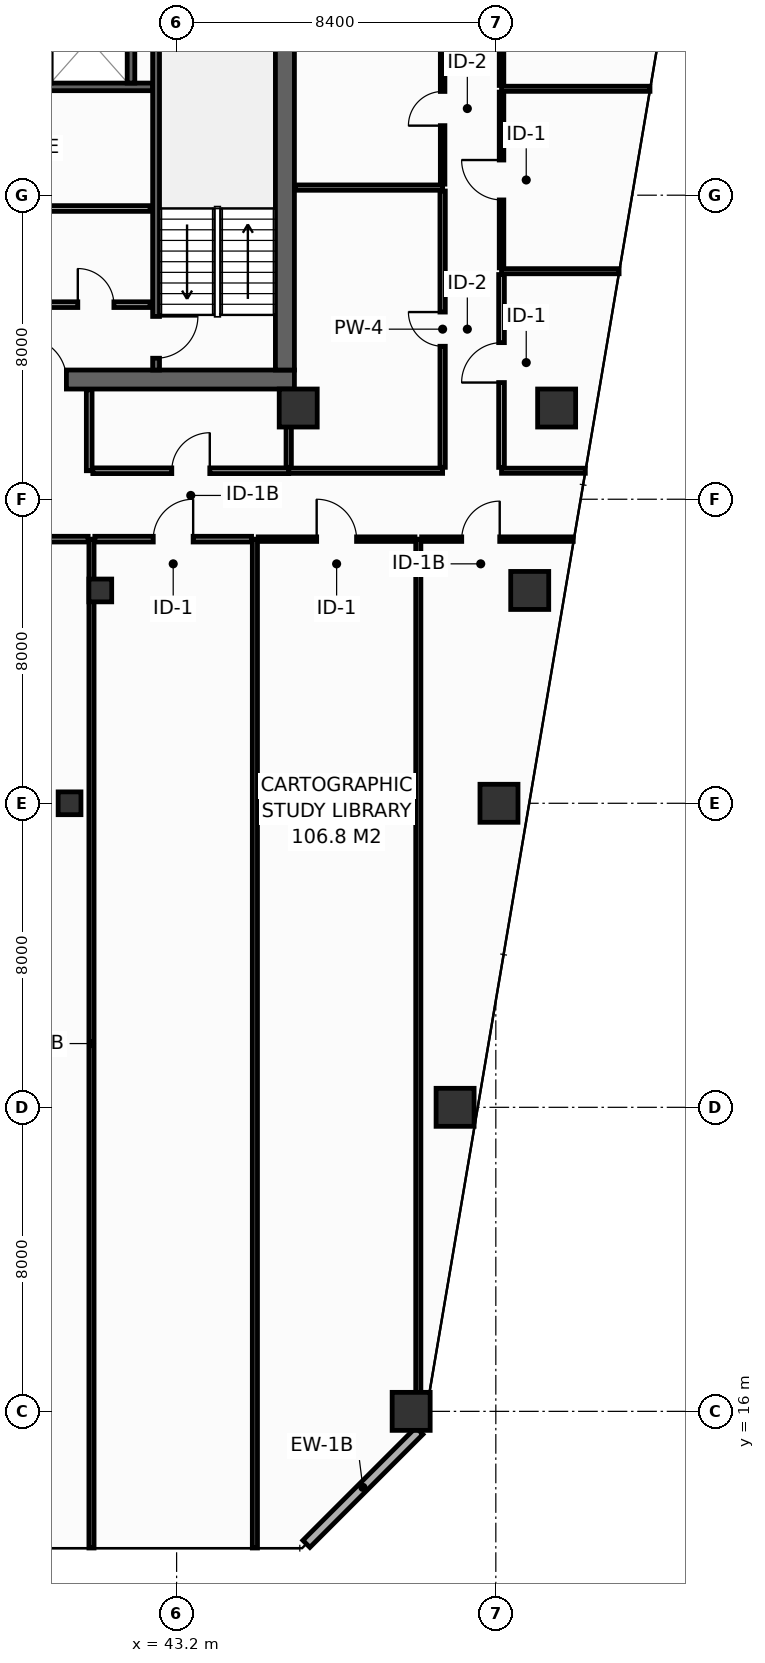
"""IFC4 building model, lengths in metres.
Left out: names, types, materials, properties, quantities, classifications, styles, units other than length and angle.
Written with IfcOpenShell. Run it as: python <this file> out.ifc"""

import sys

from ifc_helpers import new_model, si_unit, direction, frame, frame_2d, origin, origin_2d, place, context, subcontext, project, spatial, rectangle, hollow_rectangle, extrude, element, fill, save


model = new_model("IFC4")
c1 = context("Model", 3, precision=1e-05, world=origin(), true_north=direction((0.0, 1.0)))
c2 = subcontext(c1, "Body", "Model", "MODEL_VIEW")
j1 = project(units=[si_unit("LENGTHUNIT", "METRE"), si_unit("PLANEANGLEUNIT", "RADIAN")], contexts=[c1])
p1 = place(None, origin())
s1 = spatial("IfcSite", under=j1, at=p1, CompositionType="ELEMENT")
p2 = place(p1, origin())
s2 = spatial("IfcBuilding", under=s1, at=p2, CompositionType="ELEMENT")
p3 = place(p2, frame((0.0, 0.0, 171.4)))
s3 = spatial("IfcBuildingStorey", under=s2, at=p3, CompositionType="ELEMENT", Elevation=171.4)
p4 = place(p3, frame((13.6, 43.15, 0.0), z_axis=(0.0, 0.0, 1.0), x_axis=(1.0, 0.0, 0.0)))
e1 = element("IfcWall", 1, at=p4, inside=s3, PredefinedType="SHEAR", context=c2, shape_type="SweptSolid", body=[
    extrude(rectangle(XDim=32.7, YDim=0.5, at=frame_2d((16.35, 0.0))), origin(), (0.0, 0.0, 1.0), 3.55),
])
p5 = place(p4, frame((5.4, 0.0, 0.0)))
e2 = element("IfcOpeningElement", 2, at=p5, cuts=e1, PredefinedType="OPENING", context=c2, shape_type="SweptSolid", body=[
    extrude(rectangle(XDim=1.1, YDim=2.15, at=frame_2d((0.55, 1.075))), frame((0.0, 0.26, 0.0), z_axis=(0.0, -1.0, 0.0), x_axis=(1.0, 0.0, 0.0)), (0.0, 0.0, 1.0), 0.52),
])
p6 = place(p4, frame((25.6, 0.0, 0.0)))
e3 = element("IfcOpeningElement", 3, at=p6, cuts=e1, PredefinedType="OPENING", context=c2, shape_type="SweptSolid", body=[
    extrude(rectangle(XDim=1.1, YDim=2.15, at=frame_2d((0.55, 1.075))), frame((0.0, 0.26, 0.0), z_axis=(0.0, -1.0, 0.0), x_axis=(1.0, 0.0, 0.0)), (0.0, 0.0, 1.0), 0.52),
])
p7 = place(p3, frame((46.05, 43.4, 0.0), z_axis=(0.0, 0.0, 1.0), x_axis=(0.0, 1.0, 0.0)))
e4 = element("IfcWall", 4, at=p7, inside=s3, PredefinedType="SHEAR", context=c2, shape_type="SweptSolid", body=[
    extrude(rectangle(XDim=10.4, YDim=0.5, at=frame_2d((5.2, 0.0))), origin(), (0.0, 0.0, 1.0), 3.55),
])
for number, where, z_axis, x_axis in (
    (5, (46.4, 42.4, 0.0), (0.0, 0.0, 1.0), (1.0, 0.0, 0.0)),
    (6, (53.2, 42.4, 0.0), (0.0, 0.0, 1.0), (1.0, 0.0, 0.0)),
    (7, (49.372, 16.0, 0.0), (0.0, 0.0, 1.0), (1.0, 0.0, 0.0)),
    (8, (50.528, 24.0, 0.0), (0.0, 0.0, 1.0), (1.0, 0.0, 0.0)),
    (9, (51.683, 32.0, 0.0), (0.0, 0.0, 1.0), (1.0, 0.0, 0.0)),
):
    element("IfcColumn", number, at=place(p3, frame(where, z_axis=z_axis, x_axis=x_axis)), inside=s3, PredefinedType="COLUMN", context=c2, shape_type="SweptSolid", body=[
        extrude(hollow_rectangle(XDim=1.0, YDim=1.0, WallThickness=0.045, at=origin_2d()), origin(), (0.0, 0.0, 1.0), 3.8),
    ])
p8 = place(p3, frame((40.383, 32.0, 0.0), z_axis=(0.0, 0.0, 1.0), x_axis=(1.0, 0.0, 0.0)))
e10 = element("IfcColumn", 10, at=p8, inside=s3, PredefinedType="COLUMN", context=c2, shape_type="SweptSolid", body=[
    extrude(hollow_rectangle(XDim=0.6, YDim=0.6, WallThickness=0.028, at=origin_2d()), origin(), (0.0, 0.0, 1.0), 3.8),
])
p9 = place(p3, frame((52.492, 37.6, 0.0), z_axis=(0.0, 0.0, 1.0), x_axis=(1.0, 0.0, 0.0)))
e11 = element("IfcColumn", 11, at=p9, inside=s3, PredefinedType="COLUMN", context=c2, shape_type="SweptSolid", body=[
    extrude(hollow_rectangle(XDim=1.0, YDim=1.0, WallThickness=0.045, at=origin_2d()), origin(), (0.0, 0.0, 1.0), 3.8),
])
p10 = place(p3, frame((41.192, 37.6, 0.0), z_axis=(0.0, 0.0, 1.0), x_axis=(1.0, 0.0, 0.0)))
e12 = element("IfcColumn", 12, at=p10, inside=s3, PredefinedType="COLUMN", context=c2, shape_type="SweptSolid", body=[
    extrude(hollow_rectangle(XDim=0.6, YDim=0.6, WallThickness=0.028, at=origin_2d()), origin(), (0.0, 0.0, 1.0), 3.8),
])
p11 = place(p3, frame((39.525, 50.85, 0.0), z_axis=(0.0, 0.0, 1.0), x_axis=(1.0, 0.0, 0.0)))
e13 = element("IfcWall", 13, at=p11, inside=s3, PredefinedType="SHEAR", context=c2, shape_type="SweptSolid", body=[
    extrude(rectangle(XDim=3.045, YDim=0.2, at=frame_2d((1.522, 0.0))), origin(), (0.0, 0.0, 1.0), 3.55),
])
p12 = place(p3, frame((42.0, 50.95, 0.0), z_axis=(0.0, 0.0, 1.0), x_axis=(0.0, 1.0, 0.0)))
e14 = element("IfcWall", 14, at=p12, inside=s3, PredefinedType="SHEAR", context=c2, shape_type="SweptSolid", body=[
    extrude(rectangle(XDim=2.3, YDim=0.2, at=frame_2d((1.15, 0.0))), origin(), (0.0, 0.0, 1.0), 3.55),
])
p13 = place(p3, frame((42.66, 53.8, 0.0), z_axis=(0.0, 0.0, 1.0), x_axis=(0.0, -1.0, 0.0)))
e15 = element("IfcWall", 15, at=p13, inside=s3, PredefinedType="SHEAR", context=c2, shape_type="SweptSolid", body=[
    extrude(rectangle(XDim=10.4, YDim=0.18, at=frame_2d((5.2, 0.0))), origin(), (0.0, 0.0, 1.0), 3.55),
])
p14 = place(p13, frame((8.99, 0.0, 0.0)))
e16 = element("IfcOpeningElement", 16, at=p14, cuts=e15, PredefinedType="OPENING", context=c2, shape_type="SweptSolid", body=[
    extrude(rectangle(XDim=1.1, YDim=2.15, at=frame_2d((0.55, 1.075))), frame((0.0, 0.1, 0.0), z_axis=(0.0, -1.0, 0.0), x_axis=(1.0, 0.0, 0.0)), (0.0, 0.0, 1.0), 0.2),
])
p15 = place(p3, frame((33.95, 45.12, 0.0), z_axis=(0.0, 0.0, 1.0), x_axis=(1.0, 0.0, 0.0)))
e17 = element("IfcWall", 17, at=p15, inside=s3, PredefinedType="PARTITIONING", context=c2, shape_type="SweptSolid", body=[
    extrude(rectangle(XDim=8.55, YDim=0.15, at=frame_2d((4.275, 0.0))), origin(), (0.0, 0.0, 1.0), 3.55),
])
p16 = place(p15, frame((0.95, 0.0, 0.0)))
e18 = element("IfcOpeningElement", 18, at=p16, cuts=e17, PredefinedType="OPENING", context=c2, shape_type="SweptSolid", body=[
    extrude(rectangle(XDim=0.95, YDim=2.15, at=frame_2d((0.475, 1.075))), frame((0.0, 0.085, 0.0), z_axis=(0.0, -1.0, 0.0), x_axis=(1.0, 0.0, 0.0)), (0.0, 0.0, 1.0), 0.17),
])
p17 = place(p15, frame((3.8, 0.0, 0.0)))
e19 = element("IfcOpeningElement", 19, at=p17, cuts=e17, PredefinedType="OPENING", context=c2, shape_type="SweptSolid", body=[
    extrude(rectangle(XDim=0.95, YDim=2.15, at=frame_2d((0.475, 1.075))), frame((0.0, 0.085, 0.0), z_axis=(0.0, -1.0, 0.0), x_axis=(1.0, 0.0, 0.0)), (0.0, 0.0, 1.0), 0.17),
])
p18 = place(p15, frame((6.65, 0.0, 0.0)))
e20 = element("IfcOpeningElement", 20, at=p18, cuts=e17, PredefinedType="OPENING", context=c2, shape_type="SweptSolid", body=[
    extrude(rectangle(XDim=0.95, YDim=2.15, at=frame_2d((0.475, 1.075))), frame((0.0, 0.085, 0.0), z_axis=(0.0, -1.0, 0.0), x_axis=(1.0, 0.0, 0.0)), (0.0, 0.0, 1.0), 0.17),
])
p19 = place(p3, frame((33.95, 47.65, 0.0), z_axis=(0.0, 0.0, 1.0), x_axis=(1.0, 0.0, 0.0)))
e21 = element("IfcWall", 21, at=p19, inside=s3, PredefinedType="PARTITIONING", context=c2, shape_type="SweptSolid", body=[
    extrude(rectangle(XDim=8.55, YDim=0.15, at=frame_2d((4.275, 0.0))), origin(), (0.0, 0.0, 1.0), 3.55),
])
p20 = place(p3, frame((46.615, 12.513, 0.0), z_axis=(0.0, 0.0, 1.0), x_axis=(0.707135806771, 0.70707775441, 0.0)))
e22 = element("IfcWall", 22, at=p20, inside=s3, PredefinedType="STANDARD", context=c2, shape_type="SweptSolid", body=[
    extrude(rectangle(XDim=4.206, YDim=0.26, at=frame_2d((2.103, 0.0))), origin(), (0.0, 0.0, 1.0), 3.55),
])
p21 = place(p3, frame((46.15, 40.75, 0.0), z_axis=(0.0, 0.0, 1.0), x_axis=(1.0, 0.0, 0.0)))
e23 = element("IfcWall", 23, at=p21, inside=s3, PredefinedType="PARTITIONING", context=c2, shape_type="SweptSolid", body=[
    extrude(rectangle(XDim=4.05, YDim=0.14, at=frame_2d((2.025, 0.0))), origin(), (0.0, 0.0, 1.0), 3.55),
])
p22 = place(p3, frame((46.15, 40.84, 0.0), z_axis=(0.0, 0.0, 1.0), x_axis=(0.0, 1.0, 0.0)))
e24 = element("IfcWall", 24, at=p22, inside=s3, PredefinedType="PARTITIONING", context=c2, shape_type="SweptSolid", body=[
    extrude(rectangle(XDim=2.04, YDim=0.14, at=frame_2d((1.02, 0.0))), origin(), (0.0, 0.0, 1.0), 3.55),
])
p23 = place(p3, frame((46.32, 48.2, 0.0), z_axis=(0.0, 0.0, 1.0), x_axis=(1.0, 0.0, 0.0)))
e25 = element("IfcWall", 25, at=p23, inside=s3, PredefinedType="PARTITIONING", context=c2, shape_type="SweptSolid", body=[
    extrude(rectangle(XDim=3.88, YDim=0.14, at=frame_2d((1.94, 0.0))), origin(), (0.0, 0.0, 1.0), 3.55),
])
p24 = place(p3, frame((50.2, 40.84, 0.0), z_axis=(0.0, 0.0, 1.0), x_axis=(0.0, 1.0, 0.0)))
e26 = element("IfcWall", 26, at=p24, inside=s3, PredefinedType="PARTITIONING", context=c2, shape_type="SweptSolid", body=[
    extrude(rectangle(XDim=7.27, YDim=0.14, at=frame_2d((3.635, 0.0))), origin(), (0.0, 0.0, 1.0), 2.835),
])
p25 = place(p24, frame((3.185, 0.0, 0.0)))
e27 = element("IfcOpeningElement", 27, at=p25, cuts=e26, PredefinedType="OPENING", context=c2, shape_type="SweptSolid", body=[
    extrude(rectangle(XDim=0.9, YDim=2.1, at=frame_2d((0.45, 1.05))), frame((0.0, 0.08, 0.0), z_axis=(0.0, -1.0, 0.0), x_axis=(1.0, 0.0, 0.0)), (0.0, 0.0, 1.0), 0.16),
])
p26 = place(p3, frame((50.2, 48.29, 0.0), z_axis=(0.0, 0.0, 1.0), x_axis=(0.0, 1.0, 0.0)))
e28 = element("IfcWall", 28, at=p26, inside=s3, PredefinedType="PARTITIONING", context=c2, shape_type="SweptSolid", body=[
    extrude(rectangle(XDim=3.98, YDim=0.12, at=frame_2d((1.99, 0.0))), origin(), (0.0, 0.0, 1.0), 3.55),
])
p27 = place(p26, frame((1.54, 0.0, 0.0)))
e29 = element("IfcOpeningElement", 29, at=p27, cuts=e28, PredefinedType="OPENING", context=c2, shape_type="SweptSolid", body=[
    extrude(rectangle(XDim=0.9, YDim=2.1, at=frame_2d((0.45, 1.05))), frame((0.0, 0.07, 0.0), z_axis=(0.0, -1.0, 0.0), x_axis=(1.0, 0.0, 0.0)), (0.0, 0.0, 1.0), 0.14),
])
p28 = place(p3, frame((51.75, 40.75, 0.0), z_axis=(0.0, 0.0, 1.0), x_axis=(1.0, 0.0, 0.0)))
e30 = element("IfcWall", 30, at=p28, inside=s3, PredefinedType="PARTITIONING", context=c2, shape_type="SweptSolid", body=[
    extrude(rectangle(XDim=2.205, YDim=0.135, at=frame_2d((1.103, 0.0))), origin(), (0.0, 0.0, 1.0), 3.035),
])
p29 = place(p3, frame((51.75, 46.0, 0.0), z_axis=(0.0, 0.0, 1.0), x_axis=(1.0, 0.0, 0.0)))
e31 = element("IfcWall", 31, at=p29, inside=s3, PredefinedType="PARTITIONING", context=c2, shape_type="SweptSolid", body=[
    extrude(rectangle(XDim=3.094, YDim=0.135, at=frame_2d((1.547, 0.0))), origin(), (0.0, 0.0, 1.0), 2.835),
])
p30 = place(p3, frame((51.75, 50.8, 0.0), z_axis=(0.0, 0.0, 1.0), x_axis=(1.0, 0.0, 0.0)))
e32 = element("IfcWall", 32, at=p30, inside=s3, PredefinedType="PARTITIONING", context=c2, shape_type="SweptSolid", body=[
    extrude(rectangle(XDim=3.906, YDim=0.135, at=frame_2d((1.953, 0.0))), origin(), (0.0, 0.0, 1.0), 2.835),
])
p31 = place(p3, frame((51.75, 40.837, 0.0), z_axis=(0.0, 0.0, 1.0), x_axis=(0.0, 1.0, 0.0)))
e33 = element("IfcWall", 33, at=p31, inside=s3, PredefinedType="PARTITIONING", context=c2, shape_type="SweptSolid", body=[
    extrude(rectangle(XDim=5.075, YDim=0.15, at=frame_2d((2.538, 0.0))), origin(), (0.0, 0.0, 1.0), 2.835),
])
p32 = place(p31, frame((2.233, 0.0, 0.0)))
e34 = element("IfcOpeningElement", 34, at=p32, cuts=e33, PredefinedType="OPENING", context=c2, shape_type="SweptSolid", body=[
    extrude(rectangle(XDim=1.05, YDim=2.15, at=frame_2d((0.525, 1.075))), frame((0.0, 0.085, 0.0), z_axis=(0.0, -1.0, 0.0), x_axis=(1.0, 0.0, 0.0)), (0.0, 0.0, 1.0), 0.17),
])
p33 = place(p3, frame((51.75, 46.087, 0.0), z_axis=(0.0, 0.0, 1.0), x_axis=(0.0, 1.0, 0.0)))
e35 = element("IfcWall", 35, at=p33, inside=s3, PredefinedType="PARTITIONING", context=c2, shape_type="SweptSolid", body=[
    extrude(rectangle(XDim=4.625, YDim=0.12, at=frame_2d((2.312, 0.0))), origin(), (0.0, 0.0, 1.0), 3.55),
])
p34 = place(p33, frame((1.788, 0.0, 0.0)))
e36 = element("IfcOpeningElement", 36, at=p34, cuts=e35, PredefinedType="OPENING", context=c2, shape_type="SweptSolid", body=[
    extrude(rectangle(XDim=1.05, YDim=2.15, at=frame_2d((0.525, 1.075))), frame((0.0, 0.07, 0.0), z_axis=(0.0, -1.0, 0.0), x_axis=(1.0, 0.0, 0.0)), (0.0, 0.0, 1.0), 0.14),
])
p35 = place(p3, frame((51.75, 50.887, 0.0), z_axis=(0.0, 0.0, 1.0), x_axis=(0.0, 1.0, 0.0)))
e37 = element("IfcWall", 37, at=p35, inside=s3, PredefinedType="PARTITIONING", context=c2, shape_type="SweptSolid", body=[
    extrude(rectangle(XDim=5.108, YDim=0.12, at=frame_2d((2.554, 0.0))), origin(), (0.0, 0.0, 1.0), 2.935),
])
p36 = place(p35, frame((2.054, 0.0, 0.0)))
e38 = element("IfcOpeningElement", 38, at=p36, cuts=e37, PredefinedType="OPENING", context=c2, shape_type="SweptSolid", body=[
    extrude(rectangle(XDim=1.0, YDim=2.15, at=frame_2d((0.5, 1.075))), frame((0.0, 0.07, 0.0), z_axis=(0.0, -1.0, 0.0), x_axis=(1.0, 0.0, 0.0)), (0.0, 0.0, 1.0), 0.14),
])
p37 = place(p3, frame((40.9, 40.75, 0.0), z_axis=(0.0, 0.0, 1.0), x_axis=(0.0, 1.0, 0.0)))
e39 = element("IfcWall", 39, at=p37, inside=s3, PredefinedType="PARTITIONING", context=c2, shape_type="SweptSolid", body=[
    extrude(rectangle(XDim=2.13, YDim=0.15, at=frame_2d((1.065, 0.0))), origin(), (0.0, 0.0, 1.0), 3.55),
])
p38 = place(p3, frame((40.995, 40.75, 0.0), z_axis=(0.0, 0.0, 1.0), x_axis=(1.0, 0.0, 0.0)))
e40 = element("IfcWall", 40, at=p38, inside=s3, PredefinedType="PARTITIONING", context=c2, shape_type="SweptSolid", body=[
    extrude(rectangle(XDim=5.155, YDim=0.15, at=frame_2d((2.577, 0.0))), origin(), (0.0, 0.0, 1.0), 3.55),
])
p39 = place(p38, frame((2.078, 0.0, 0.0)))
e41 = element("IfcOpeningElement", 41, at=p39, cuts=e40, PredefinedType="OPENING", context=c2, shape_type="SweptSolid", body=[
    extrude(rectangle(XDim=1.0, YDim=2.15, at=frame_2d((0.5, 1.075))), frame((0.0, 0.085, 0.0), z_axis=(0.0, -1.0, 0.0), x_axis=(1.0, 0.0, 0.0)), (0.0, 0.0, 1.0), 0.17),
])
for number, where, z_axis, x_axis in (
    (42, (40.96, 12.405, 0.0), (0.0, 0.0, 1.0), (0.0, 1.0, 0.0)),
    (43, (45.26, 12.405, 0.0), (0.0, 0.0, 1.0), (0.0, 1.0, 0.0)),
):
    element("IfcWall", number, at=place(p3, frame(where, z_axis=z_axis, x_axis=x_axis)), inside=s3, PredefinedType="PARTITIONING", context=c2, shape_type="SweptSolid", body=[
        extrude(rectangle(XDim=26.545, YDim=0.135, at=frame_2d((13.272, 0.0))), origin(), (0.0, 0.0, 1.0), 2.835),
    ])
p40 = place(p3, frame((49.56, 15.516, 0.0), z_axis=(0.0, 0.0, 1.0), x_axis=(0.0, 1.0, 0.0)))
e44 = element("IfcWall", 44, at=p40, inside=s3, PredefinedType="PARTITIONING", context=c2, shape_type="SweptSolid", body=[
    extrude(rectangle(XDim=23.434, YDim=0.135, at=frame_2d((11.717, 0.0))), origin(), (0.0, 0.0, 1.0), 2.835),
])
p41 = place(p3, frame((36.15, 38.95, 0.0), z_axis=(0.0, 0.0, 1.0), x_axis=(1.0, 0.0, 0.0)))
e45 = element("IfcWall", 45, at=p41, inside=s3, PredefinedType="PARTITIONING", context=c2, shape_type="SweptSolid", body=[
    extrude(rectangle(XDim=4.723, YDim=0.15, at=frame_2d((2.361, 0.0))), origin(), (0.0, 0.0, 1.0), 2.835),
])
p42 = place(p41, frame((1.861, 0.0, 0.0)))
e46 = element("IfcOpeningElement", 46, at=p42, cuts=e45, PredefinedType="OPENING", context=c2, shape_type="SweptSolid", body=[
    extrude(rectangle(XDim=1.0, YDim=2.15, at=frame_2d((0.5, 1.075))), frame((0.0, 0.085, 0.0), z_axis=(0.0, -1.0, 0.0), x_axis=(1.0, 0.0, 0.0)), (0.0, 0.0, 1.0), 0.17),
])
p43 = place(p3, frame((41.048, 38.95, 0.0), z_axis=(0.0, 0.0, 1.0), x_axis=(1.0, 0.0, 0.0)))
e47 = element("IfcWall", 47, at=p43, inside=s3, PredefinedType="PARTITIONING", context=c2, shape_type="SweptSolid", body=[
    extrude(rectangle(XDim=4.125, YDim=0.15, at=frame_2d((2.062, 0.0))), origin(), (0.0, 0.0, 1.0), 3.55),
])
p44 = place(p43, frame((1.538, 0.0, 0.0)))
e48 = element("IfcOpeningElement", 48, at=p44, cuts=e47, PredefinedType="OPENING", context=c2, shape_type="SweptSolid", body=[
    extrude(rectangle(XDim=1.05, YDim=2.15, at=frame_2d((0.525, 1.075))), frame((0.0, 0.085, 0.0), z_axis=(0.0, -1.0, 0.0), x_axis=(1.0, 0.0, 0.0)), (0.0, 0.0, 1.0), 0.17),
])
p45 = place(p3, frame((45.347, 38.95, 0.0), z_axis=(0.0, 0.0, 1.0), x_axis=(1.0, 0.0, 0.0)))
e49 = element("IfcWall", 49, at=p45, inside=s3, PredefinedType="PARTITIONING", context=c2, shape_type="SweptSolid", body=[
    extrude(rectangle(XDim=4.125, YDim=0.12, at=frame_2d((2.062, 0.0))), origin(), (0.0, 0.0, 1.0), 3.55),
])
p46 = place(p45, frame((1.538, 0.0, 0.0)))
e50 = element("IfcOpeningElement", 50, at=p46, cuts=e49, PredefinedType="OPENING", context=c2, shape_type="SweptSolid", body=[
    extrude(rectangle(XDim=1.05, YDim=2.15, at=frame_2d((0.525, 1.075))), frame((0.0, 0.07, 0.0), z_axis=(0.0, -1.0, 0.0), x_axis=(1.0, 0.0, 0.0)), (0.0, 0.0, 1.0), 0.14),
])
p47 = place(p3, frame((49.647, 38.95, 0.0), z_axis=(0.0, 0.0, 1.0), x_axis=(1.0, 0.0, 0.0)))
e51 = element("IfcWall", 51, at=p47, inside=s3, PredefinedType="PARTITIONING", context=c2, shape_type="SweptSolid", body=[
    extrude(rectangle(XDim=3.99, YDim=0.12, at=frame_2d((1.995, 0.0))), origin(), (0.0, 0.0, 1.0), 3.035),
])
p48 = place(p47, frame((1.055, 0.0, 0.0)))
e52 = element("IfcOpeningElement", 52, at=p48, cuts=e51, PredefinedType="OPENING", context=c2, shape_type="SweptSolid", body=[
    extrude(rectangle(XDim=1.0, YDim=2.15, at=frame_2d((0.5, 1.075))), frame((0.0, 0.07, 0.0), z_axis=(0.0, -1.0, 0.0), x_axis=(1.0, 0.0, 0.0)), (0.0, 0.0, 1.0), 0.14),
])
p49 = place(p14, origin())
e53 = element("IfcDoor", 53, at=p49, inside=s3, OperationType="SINGLE_SWING_LEFT", PredefinedType="DOOR", context=c2, shape_type="SweptSolid", body=[
    extrude(rectangle(XDim=1.1, YDim=2.15, at=frame_2d((0.55, 1.075))), frame((0.0, 0.025, 0.0), z_axis=(0.0, -1.0, 0.0), x_axis=(1.0, 0.0, 0.0)), (0.0, 0.0, 1.0), 0.05),
])
fill(e16, e53)
p50 = place(p6, origin())
e54 = element("IfcDoor", 54, at=p50, inside=s3, OperationType="SINGLE_SWING_LEFT", PredefinedType="DOOR", context=c2, shape_type="SweptSolid", body=[
    extrude(rectangle(XDim=1.1, YDim=2.15, at=frame_2d((0.55, 1.075))), frame((0.0, 0.025, 0.0), z_axis=(0.0, -1.0, 0.0), x_axis=(1.0, 0.0, 0.0)), (0.0, 0.0, 1.0), 0.05),
])
fill(e3, e54)
p51 = place(p18, origin())
e55 = element("IfcDoor", 55, at=p51, inside=s3, OperationType="SINGLE_SWING_LEFT", PredefinedType="DOOR", context=c2, shape_type="SweptSolid", body=[
    extrude(rectangle(XDim=0.95, YDim=2.15, at=frame_2d((0.475, 1.075))), frame((0.0, 0.025, 0.0), z_axis=(0.0, -1.0, 0.0), x_axis=(1.0, 0.0, 0.0)), (0.0, 0.0, 1.0), 0.05),
])
fill(e20, e55)
p52 = place(p25, origin())
e56 = element("IfcDoor", 56, at=p52, inside=s3, OperationType="SINGLE_SWING_RIGHT", PredefinedType="DOOR", context=c2, shape_type="SweptSolid", body=[
    extrude(rectangle(XDim=0.9, YDim=2.1, at=frame_2d((0.45, 1.05))), frame((0.0, 0.025, 0.0), z_axis=(0.0, -1.0, 0.0), x_axis=(1.0, 0.0, 0.0)), (0.0, 0.0, 1.0), 0.05),
])
fill(e27, e56)
p53 = place(p27, origin())
e57 = element("IfcDoor", 57, at=p53, inside=s3, OperationType="SINGLE_SWING_LEFT", PredefinedType="DOOR", context=c2, shape_type="SweptSolid", body=[
    extrude(rectangle(XDim=0.9, YDim=2.1, at=frame_2d((0.45, 1.05))), frame((0.0, 0.025, 0.0), z_axis=(0.0, -1.0, 0.0), x_axis=(1.0, 0.0, 0.0)), (0.0, 0.0, 1.0), 0.05),
])
fill(e29, e57)
p54 = place(p32, origin())
e58 = element("IfcDoor", 58, at=p54, inside=s3, OperationType="SINGLE_SWING_LEFT", PredefinedType="DOOR", context=c2, shape_type="SweptSolid", body=[
    extrude(rectangle(XDim=1.05, YDim=2.15, at=frame_2d((0.525, 1.075))), frame((0.0, 0.025, 0.0), z_axis=(0.0, -1.0, 0.0), x_axis=(1.0, 0.0, 0.0)), (0.0, 0.0, 1.0), 0.05),
])
fill(e34, e58)
p55 = place(p34, origin())
e59 = element("IfcDoor", 59, at=p55, inside=s3, OperationType="SINGLE_SWING_RIGHT", PredefinedType="DOOR", context=c2, shape_type="SweptSolid", body=[
    extrude(rectangle(XDim=1.05, YDim=2.15, at=frame_2d((0.525, 1.075))), frame((0.0, 0.025, 0.0), z_axis=(0.0, -1.0, 0.0), x_axis=(1.0, 0.0, 0.0)), (0.0, 0.0, 1.0), 0.05),
])
fill(e36, e59)
p56 = place(p39, origin())
e60 = element("IfcDoor", 60, at=p56, inside=s3, OperationType="SINGLE_SWING_RIGHT", PredefinedType="DOOR", context=c2, shape_type="SweptSolid", body=[
    extrude(rectangle(XDim=1.0, YDim=2.15, at=frame_2d((0.5, 1.075))), frame((0.0, 0.025, 0.0), z_axis=(0.0, -1.0, 0.0), x_axis=(1.0, 0.0, 0.0)), (0.0, 0.0, 1.0), 0.05),
])
fill(e41, e60)
p57 = place(p44, origin())
e61 = element("IfcDoor", 61, at=p57, inside=s3, OperationType="SINGLE_SWING_RIGHT", PredefinedType="DOOR", context=c2, shape_type="SweptSolid", body=[
    extrude(rectangle(XDim=1.05, YDim=2.15, at=frame_2d((0.525, 1.075))), frame((0.0, 0.025, 0.0), z_axis=(0.0, -1.0, 0.0), x_axis=(1.0, 0.0, 0.0)), (0.0, 0.0, 1.0), 0.05),
])
fill(e48, e61)
p58 = place(p46, origin())
e62 = element("IfcDoor", 62, at=p58, inside=s3, OperationType="SINGLE_SWING_LEFT", PredefinedType="DOOR", context=c2, shape_type="SweptSolid", body=[
    extrude(rectangle(XDim=1.05, YDim=2.15, at=frame_2d((0.525, 1.075))), frame((0.0, 0.025, 0.0), z_axis=(0.0, -1.0, 0.0), x_axis=(1.0, 0.0, 0.0)), (0.0, 0.0, 1.0), 0.05),
])
fill(e50, e62)
p59 = place(p48, origin())
e63 = element("IfcDoor", 63, at=p59, inside=s3, OperationType="SINGLE_SWING_RIGHT", PredefinedType="DOOR", context=c2, shape_type="SweptSolid", body=[
    extrude(rectangle(XDim=1.0, YDim=2.15, at=frame_2d((0.5, 1.075))), frame((0.0, 0.025, 0.0), z_axis=(0.0, -1.0, 0.0), x_axis=(1.0, 0.0, 0.0)), (0.0, 0.0, 1.0), 0.05),
])
fill(e52, e63)
save(model, sys.argv[1])
